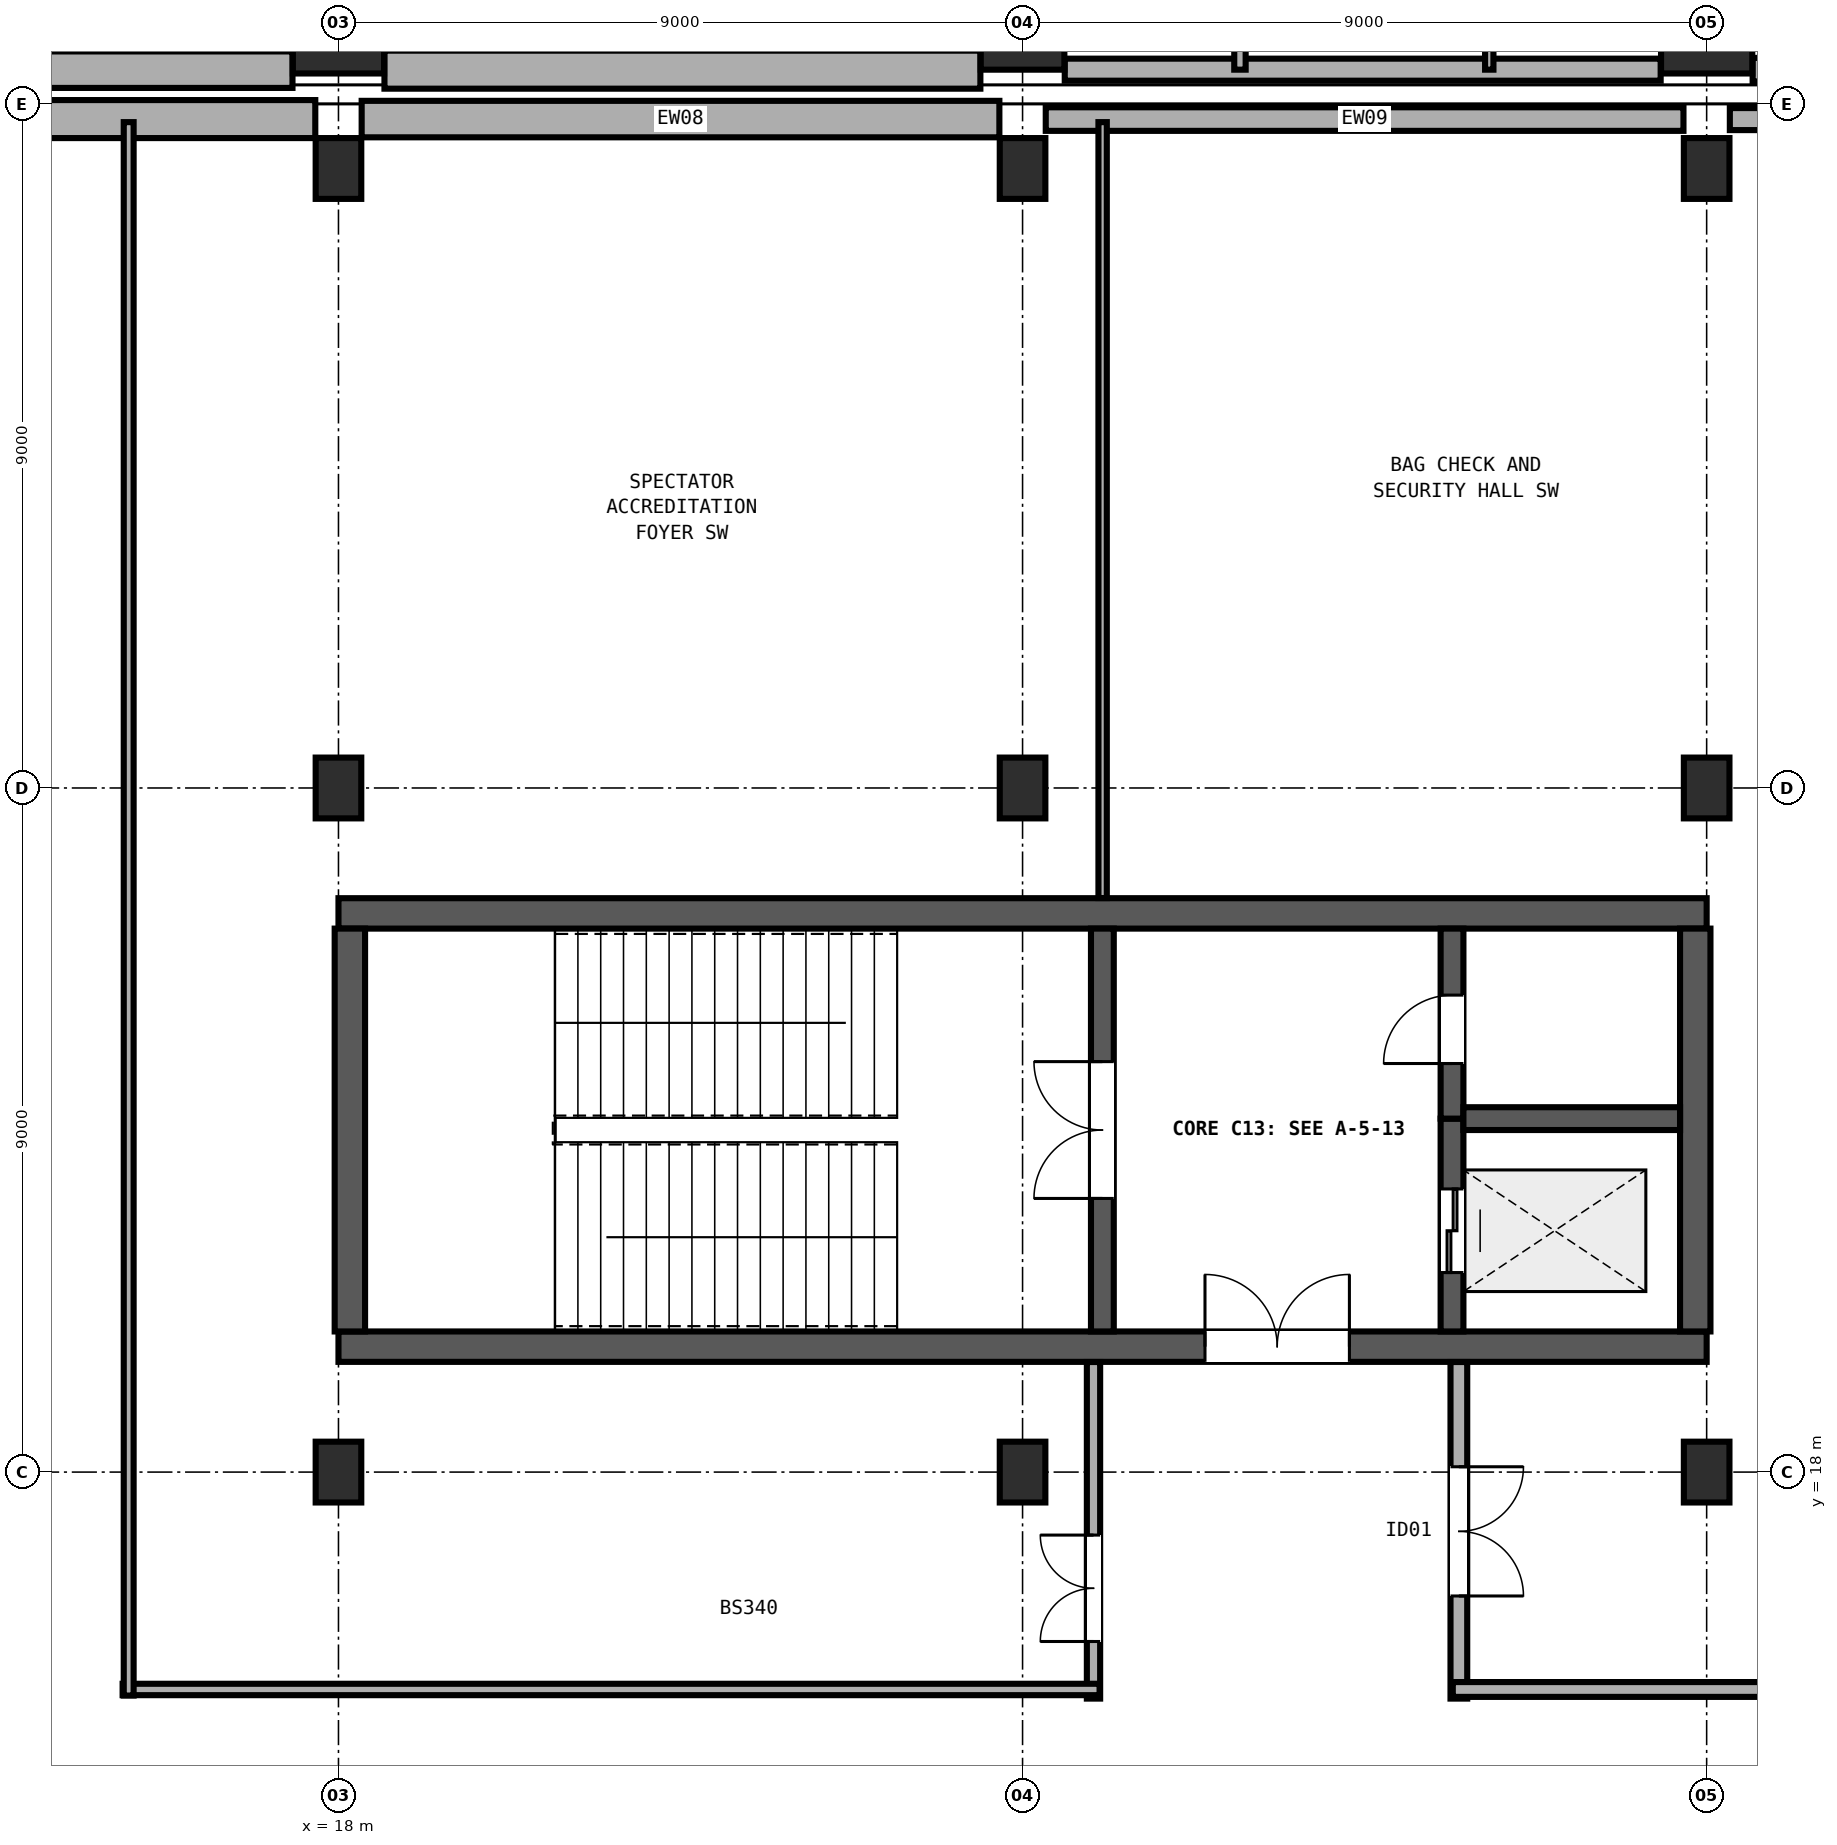
"""IFC4 building model, lengths in metres.
Left out: names, types, materials, properties, quantities, classifications, styles, units other than length and angle.
Written with IfcOpenShell. Run it as: python <this file> out.ifc"""

import sys

from ifc_helpers import new_model, si_unit, direction, frame, frame_2d, origin, origin_2d, place, context, subcontext, project, spatial, rectangle, extrude, element, fill, save


model = new_model("IFC4")
c1 = context("Model", 3, precision=1e-05, world=origin(), true_north=direction((0.0, 1.0)))
c2 = subcontext(c1, "Body", "Model", "MODEL_VIEW")
j1 = project(units=[si_unit("LENGTHUNIT", "METRE"), si_unit("PLANEANGLEUNIT", "RADIAN")], contexts=[c1])
p1 = place(None, origin())
s1 = spatial("IfcSite", under=j1, at=p1, CompositionType="ELEMENT")
p2 = place(p1, origin())
s2 = spatial("IfcBuilding", under=s1, at=p2, CompositionType="ELEMENT")
p3 = place(p2, origin())
s3 = spatial("IfcBuildingStorey", under=s2, at=p3, CompositionType="ELEMENT", Elevation=0.0)
p4 = place(p3, frame((18.0, 37.1, 0.0), z_axis=(0.0, 0.0, 1.0), x_axis=(1.0, 0.0, 0.0)))
e1 = element("IfcColumn", 1, at=p4, inside=s3, PredefinedType="COLUMN", context=c2, shape_type="SweptSolid", body=[
    extrude(rectangle(XDim=1.2, YDim=1.4, at=origin_2d()), origin(), (0.0, 0.0, 1.0), 4.8),
])
p5 = place(p3, frame((27.0, 37.1, 0.0), z_axis=(0.0, 0.0, 1.0), x_axis=(1.0, 0.0, 0.0)))
e2 = element("IfcColumn", 2, at=p5, inside=s3, PredefinedType="COLUMN", context=c2, shape_type="SweptSolid", body=[
    extrude(rectangle(XDim=1.1, YDim=1.3, at=origin_2d()), origin(), (0.0, 0.0, 1.0), 4.8),
])
p6 = place(p3, frame((36.0, 37.1, 0.0), z_axis=(0.0, 0.0, 1.0), x_axis=(1.0, 0.0, 0.0)))
e3 = element("IfcColumn", 3, at=p6, inside=s3, PredefinedType="COLUMN", context=c2, shape_type="SweptSolid", body=[
    extrude(rectangle(XDim=1.2, YDim=1.4, at=origin_2d()), origin(), (0.0, 0.0, 1.0), 4.8),
])
for number, where, z_axis, x_axis in (
    (4, (18.0, 18.0, 0.0), (0.0, 0.0, 1.0), (1.0, 0.0, 0.0)),
    (5, (18.0, 27.0, 0.0), (0.0, 0.0, 1.0), (1.0, 0.0, 0.0)),
    (6, (18.0, 35.15, 0.0), (0.0, 0.0, 1.0), (1.0, 0.0, 0.0)),
    (7, (27.0, 18.0, 0.0), (0.0, 0.0, 1.0), (1.0, 0.0, 0.0)),
    (8, (27.0, 27.0, 0.0), (0.0, 0.0, 1.0), (1.0, 0.0, 0.0)),
    (9, (27.0, 35.15, 0.0), (0.0, 0.0, 1.0), (1.0, 0.0, 0.0)),
    (10, (36.0, 18.0, 0.0), (0.0, 0.0, 1.0), (1.0, 0.0, 0.0)),
    (11, (36.0, 27.0, 0.0), (0.0, 0.0, 1.0), (1.0, 0.0, 0.0)),
    (12, (36.0, 35.15, 0.0), (0.0, 0.0, 1.0), (1.0, 0.0, 0.0)),
):
    element("IfcColumn", number, at=place(p3, frame(where, z_axis=z_axis, x_axis=x_axis)), inside=s3, PredefinedType="COLUMN", context=c2, shape_type="SweptSolid", body=[
        extrude(rectangle(XDim=0.6, YDim=0.8, at=origin_2d()), origin(), (0.0, 0.0, 1.0), 4.8),
    ])
p7 = place(p3, frame((18.0, 19.65, 0.0), z_axis=(0.0, 0.0, 1.0), x_axis=(1.0, 0.0, 0.0)))
e13 = element("IfcWall", 13, at=p7, inside=s3, PredefinedType="SHEAR", context=c2, shape_type="SweptSolid", body=[
    extrude(rectangle(XDim=18.0, YDim=0.4, at=frame_2d((9.0, 0.0))), origin(), (0.0, 0.0, 1.0), 4.5),
])
p8 = place(p7, frame((11.4, 0.0, 0.0)))
e14 = element("IfcOpeningElement", 14, at=p8, cuts=e13, PredefinedType="OPENING", context=c2, shape_type="SweptSolid", body=[
    extrude(rectangle(XDim=1.9, YDim=2.25, at=frame_2d((0.95, 1.125))), frame((0.0, 0.21, 0.0), z_axis=(0.0, -1.0, 0.0), x_axis=(1.0, 0.0, 0.0)), (0.0, 0.0, 1.0), 0.42),
])
p9 = place(p3, frame((36.0, 25.35, 0.0), z_axis=(0.0, 0.0, 1.0), x_axis=(-1.0, 0.0, 0.0)))
e15 = element("IfcWall", 15, at=p9, inside=s3, PredefinedType="SHEAR", context=c2, shape_type="SweptSolid", body=[
    extrude(rectangle(XDim=18.0, YDim=0.4, at=frame_2d((9.0, 0.0))), origin(), (0.0, 0.0, 1.0), 4.5),
])
for number, where, z_axis, x_axis in (
    (16, (18.15, 25.15, 0.0), (0.0, 0.0, 1.0), (0.0, -1.0, 0.0)),
    (17, (35.85, 19.85, 0.0), (0.0, 0.0, 1.0), (0.0, 1.0, 0.0)),
):
    element("IfcWall", number, at=place(p3, frame(where, z_axis=z_axis, x_axis=x_axis)), inside=s3, PredefinedType="SHEAR", context=c2, shape_type="SweptSolid", body=[
        extrude(rectangle(XDim=5.3, YDim=0.4, at=frame_2d((2.65, 0.0))), origin(), (0.0, 0.0, 1.0), 4.5),
    ])
p10 = place(p3, frame((28.05, 19.85, 0.0), z_axis=(0.0, 0.0, 1.0), x_axis=(0.0, 1.0, 0.0)))
e18 = element("IfcWall", 18, at=p10, inside=s3, PredefinedType="SHEAR", context=c2, shape_type="SweptSolid", body=[
    extrude(rectangle(XDim=5.3, YDim=0.3, at=frame_2d((2.65, 0.0))), origin(), (0.0, 0.0, 1.0), 4.5),
])
p11 = place(p10, frame((1.75, 0.0, 0.0)))
e19 = element("IfcOpeningElement", 19, at=p11, cuts=e18, PredefinedType="OPENING", context=c2, shape_type="SweptSolid", body=[
    extrude(rectangle(XDim=1.8, YDim=2.25, at=frame_2d((0.9, 1.125))), frame((0.0, 0.16, 0.0), z_axis=(0.0, -1.0, 0.0), x_axis=(1.0, 0.0, 0.0)), (0.0, 0.0, 1.0), 0.32),
])
p12 = place(p3, frame((32.65, 19.85, 0.0), z_axis=(0.0, 0.0, 1.0), x_axis=(0.0, 1.0, 0.0)))
e20 = element("IfcWall", 20, at=p12, inside=s3, PredefinedType="SHEAR", context=c2, shape_type="SweptSolid", body=[
    extrude(rectangle(XDim=2.8, YDim=0.3, at=frame_2d((1.4, 0.0))), origin(), (0.0, 0.0, 1.0), 4.5),
])
p13 = place(p12, frame((0.775, 0.0, 0.0)))
e21 = element("IfcOpeningElement", 21, at=p13, cuts=e20, PredefinedType="OPENING", context=c2, shape_type="SweptSolid", body=[
    extrude(rectangle(XDim=1.1, YDim=2.1, at=frame_2d((0.55, 1.05))), frame((0.0, 0.16, 0.0), z_axis=(0.0, -1.0, 0.0), x_axis=(1.0, 0.0, 0.0)), (0.0, 0.0, 1.0), 0.32),
])
p14 = place(p3, frame((32.65, 22.65, 0.0), z_axis=(0.0, 0.0, 1.0), x_axis=(0.0, 1.0, 0.0)))
e22 = element("IfcWall", 22, at=p14, inside=s3, PredefinedType="SHEAR", context=c2, shape_type="SweptSolid", body=[
    extrude(rectangle(XDim=2.5, YDim=0.3, at=frame_2d((1.25, 0.0))), origin(), (0.0, 0.0, 1.0), 4.5),
])
p15 = place(p14, frame((0.725, 0.0, 0.0)))
e23 = element("IfcOpeningElement", 23, at=p15, cuts=e22, PredefinedType="OPENING", context=c2, shape_type="SweptSolid", body=[
    extrude(rectangle(XDim=0.9, YDim=2.1, at=frame_2d((0.45, 1.05))), frame((0.0, 0.16, 0.0), z_axis=(0.0, -1.0, 0.0), x_axis=(1.0, 0.0, 0.0)), (0.0, 0.0, 1.0), 0.32),
])
p16 = place(p3, frame((32.8, 22.65, 0.0), z_axis=(0.0, 0.0, 1.0), x_axis=(1.0, 0.0, 0.0)))
e24 = element("IfcWall", 24, at=p16, inside=s3, PredefinedType="SHEAR", context=c2, shape_type="SweptSolid", body=[
    extrude(rectangle(XDim=2.85, YDim=0.3, at=frame_2d((1.425, 0.0))), origin(), (0.0, 0.0, 1.0), 4.5),
])
p17 = place(p3, frame((43.745, 36.45, 0.0), z_axis=(0.0, 0.0, 1.0), x_axis=(-1.0, 0.0, 0.0)))
e25 = element("IfcWall", 25, at=p17, inside=s3, PredefinedType="SOLIDWALL", context=c2, shape_type="SweptSolid", body=[
    extrude(rectangle(XDim=7.14, YDim=0.31, at=frame_2d((3.57, 0.0))), origin(), (0.0, 0.0, 1.0), 3.28),
])
p18 = place(p3, frame((35.395, 36.45, 0.0), z_axis=(0.0, 0.0, 1.0), x_axis=(-1.0, 0.0, 0.0)))
e26 = element("IfcWall", 26, at=p18, inside=s3, PredefinedType="SOLIDWALL", context=c2, shape_type="SweptSolid", body=[
    extrude(rectangle(XDim=7.84, YDim=0.29, at=frame_2d((3.92, 0.0))), origin(), (0.0, 0.0, 1.0), 3.28),
])
p19 = place(p3, frame((26.445, 36.45, 0.0), z_axis=(0.0, 0.0, 1.0), x_axis=(-1.0, 0.0, 0.0)))
e27 = element("IfcWall", 27, at=p19, inside=s3, PredefinedType="SOLIDWALL", context=c2, shape_type="SweptSolid", body=[
    extrude(rectangle(XDim=7.84, YDim=0.5, at=frame_2d((3.92, 0.0))), origin(), (0.0, 0.0, 1.0), 3.28),
])
p20 = place(p3, frame((17.395, 36.45, 0.0), z_axis=(0.0, 0.0, 1.0), x_axis=(-1.0, 0.0, 0.0)))
e28 = element("IfcWall", 28, at=p20, inside=s3, PredefinedType="SOLIDWALL", context=c2, shape_type="SweptSolid", body=[
    extrude(rectangle(XDim=7.84, YDim=0.48, at=frame_2d((3.92, 0.0))), origin(), (0.0, 0.0, 1.0), 3.28),
])
p21 = place(p3, frame((9.305, 35.8, 0.0), z_axis=(0.0, 0.0, 1.0), x_axis=(1.0, 0.0, 0.0)))
e29 = element("IfcWall", 29, at=p21, inside=s3, PredefinedType="SOLIDWALL", context=c2, shape_type="SweptSolid", body=[
    extrude(rectangle(XDim=8.39, YDim=0.5, at=frame_2d((4.195, 0.0))), origin(), (0.0, 0.0, 1.0), 3.28),
])
p22 = place(p3, frame((18.305, 35.8, 0.0), z_axis=(0.0, 0.0, 1.0), x_axis=(1.0, 0.0, 0.0)))
e30 = element("IfcWall", 30, at=p22, inside=s3, PredefinedType="SOLIDWALL", context=c2, shape_type="SweptSolid", body=[
    extrude(rectangle(XDim=8.39, YDim=0.48, at=frame_2d((4.195, 0.0))), origin(), (0.0, 0.0, 1.0), 3.28),
])
p23 = place(p3, frame((27.305, 35.8, 0.0), z_axis=(0.0, 0.0, 1.0), x_axis=(1.0, 0.0, 0.0)))
e31 = element("IfcWall", 31, at=p23, inside=s3, PredefinedType="SOLIDWALL", context=c2, shape_type="SweptSolid", body=[
    extrude(rectangle(XDim=8.39, YDim=0.31, at=frame_2d((4.195, 0.0))), origin(), (0.0, 0.0, 1.0), 3.28),
])
p24 = place(p3, frame((36.305, 35.8, 0.0), z_axis=(0.0, 0.0, 1.0), x_axis=(1.0, 0.0, 0.0)))
e32 = element("IfcWall", 32, at=p24, inside=s3, PredefinedType="SOLIDWALL", context=c2, shape_type="SweptSolid", body=[
    extrude(rectangle(XDim=8.39, YDim=0.29, at=frame_2d((4.195, 0.0))), origin(), (0.0, 0.0, 1.0), 3.28),
])
p25 = place(p3, frame((17.95, 53.148, 0.0), z_axis=(0.0, 0.0, 1.0), x_axis=(0.0, -1.0, 0.0)))
e33 = element("IfcWall", 33, at=p25, inside=s3, PredefinedType="PARTITIONING", context=c2, shape_type="SweptSolid", body=[
    extrude(rectangle(XDim=16.658, YDim=0.11, at=frame_2d((8.329, 0.0))), origin(), (0.0, 0.0, 1.0), 3.28),
])
p26 = place(p3, frame((29.86, 36.45, 0.0), z_axis=(0.0, 0.0, 1.0), x_axis=(0.0, 1.0, 0.0)))
e34 = element("IfcWall", 34, at=p26, inside=s3, PredefinedType="PARTITIONING", context=c2, shape_type="SweptSolid", body=[
    extrude(rectangle(XDim=22.78, YDim=0.15, at=frame_2d((11.39, 0.0))), origin(), (0.0, 0.0, 1.0), 3.28),
])
p27 = place(p26, frame((10.615, 0.0, 0.0)))
e35 = element("IfcOpeningElement", 35, at=p27, cuts=e34, PredefinedType="OPENING", context=c2, shape_type="SweptSolid", body=[
    extrude(rectangle(XDim=1.55, YDim=2.2, at=frame_2d((0.775, 1.1))), frame((0.0, 0.085, 0.0), z_axis=(0.0, -1.0, 0.0), x_axis=(1.0, 0.0, 0.0)), (0.0, 0.0, 1.0), 0.17),
])
p28 = place(p3, frame((33.14, 54.342, 0.0), z_axis=(0.0, 0.0, 1.0), x_axis=(0.0, -1.0, 0.0)))
e36 = element("IfcWall", 36, at=p28, inside=s3, PredefinedType="PARTITIONING", context=c2, shape_type="SweptSolid", body=[
    extrude(rectangle(XDim=17.892, YDim=0.11, at=frame_2d((8.946, 0.0))), origin(), (0.0, 0.0, 1.0), 3.28),
])
p29 = place(p28, frame((8.246, 0.0, 0.0)))
e37 = element("IfcOpeningElement", 37, at=p29, cuts=e36, PredefinedType="OPENING", context=c2, shape_type="SweptSolid", body=[
    extrude(rectangle(XDim=1.4, YDim=2.15, at=frame_2d((0.7, 1.075))), frame((0.0, 0.065, 0.0), z_axis=(0.0, -1.0, 0.0), x_axis=(1.0, 0.0, 0.0)), (0.0, 0.0, 1.0), 0.13),
])
p30 = place(p3, frame((27.933, 15.02, 0.0), z_axis=(0.0, 0.0, 1.0), x_axis=(0.0, 1.0, 0.0)))
e38 = element("IfcWall", 38, at=p30, inside=s3, PredefinedType="PARTITIONING", context=c2, shape_type="SweptSolid", body=[
    extrude(rectangle(XDim=4.428, YDim=0.175, at=frame_2d((2.214, 0.0))), origin(), (0.0, 0.0, 1.0), 3.28),
])
p31 = place(p30, frame((0.751, 0.0, 0.0)))
e39 = element("IfcOpeningElement", 39, at=p31, cuts=e38, PredefinedType="OPENING", context=c2, shape_type="SweptSolid", body=[
    extrude(rectangle(XDim=1.4, YDim=2.15, at=frame_2d((0.7, 1.075))), frame((0.0, 0.097, 0.0), z_axis=(0.0, -1.0, 0.0), x_axis=(1.0, 0.0, 0.0)), (0.0, 0.0, 1.0), 0.195),
])
p32 = place(p3, frame((28.013, 15.14, 0.0), z_axis=(0.0, 0.0, 1.0), x_axis=(-1.0, 0.0, 0.0)))
e40 = element("IfcWall", 40, at=p32, inside=s3, PredefinedType="PARTITIONING", context=c2, shape_type="SweptSolid", body=[
    extrude(rectangle(XDim=12.853, YDim=0.15, at=frame_2d((6.427, 0.0))), origin(), (0.0, 0.0, 1.0), 3.28),
])
p33 = place(p3, frame((15.24, 15.06, 0.0), z_axis=(0.0, 0.0, 1.0), x_axis=(0.0, 1.0, 0.0)))
e41 = element("IfcWall", 41, at=p33, inside=s3, PredefinedType="PARTITIONING", context=c2, shape_type="SweptSolid", body=[
    extrude(rectangle(XDim=20.7, YDim=0.13, at=frame_2d((10.35, 0.0))), origin(), (0.0, 0.0, 1.0), 3.28),
])
p34 = place(p3, frame((28.053, 35.76, 0.0), z_axis=(0.0, 0.0, 1.0), x_axis=(0.0, -1.0, 0.0)))
e42 = element("IfcWall", 42, at=p34, inside=s3, PredefinedType="PARTITIONING", context=c2, shape_type="SweptSolid", body=[
    extrude(rectangle(XDim=10.208, YDim=0.11, at=frame_2d((5.104, 0.0))), origin(), (0.0, 0.0, 1.0), 3.28),
])
p35 = place(p3, frame((32.74, 19.448, 0.0), z_axis=(0.0, 0.0, 1.0), x_axis=(0.0, -1.0, 0.0)))
e43 = element("IfcWall", 43, at=p35, inside=s3, PredefinedType="PARTITIONING", context=c2, shape_type="SweptSolid", body=[
    extrude(rectangle(XDim=4.428, YDim=0.22, at=frame_2d((2.214, 0.0))), origin(), (0.0, 0.0, 1.0), 3.28),
])
p36 = place(p35, frame((1.378, 0.0, 0.0)))
e44 = element("IfcOpeningElement", 44, at=p36, cuts=e43, PredefinedType="OPENING", context=c2, shape_type="SweptSolid", body=[
    extrude(rectangle(XDim=1.7, YDim=2.2, at=frame_2d((0.85, 1.1))), frame((0.0, 0.12, 0.0), z_axis=(0.0, -1.0, 0.0), x_axis=(1.0, 0.0, 0.0)), (0.0, 0.0, 1.0), 0.24),
])
p37 = place(p3, frame((40.827, 15.14, 0.0), z_axis=(0.0, 0.0, 1.0), x_axis=(-1.0, 0.0, 0.0)))
e45 = element("IfcWall", 45, at=p37, inside=s3, PredefinedType="PARTITIONING", context=c2, shape_type="SweptSolid", body=[
    extrude(rectangle(XDim=8.167, YDim=0.195, at=frame_2d((4.083, 0.0))), origin(), (0.0, 0.0, 1.0), 3.28),
])
p38 = place(p11, origin())
e46 = element("IfcDoor", 46, at=p38, inside=s3, OperationType="DOUBLE_DOOR_SINGLE_SWING", PredefinedType="DOOR", context=c2, shape_type="SweptSolid", body=[
    extrude(rectangle(XDim=1.8, YDim=2.25, at=frame_2d((0.9, 1.125))), frame((0.0, 0.025, 0.0), z_axis=(0.0, -1.0, 0.0), x_axis=(1.0, 0.0, 0.0)), (0.0, 0.0, 1.0), 0.05),
])
fill(e19, e46)
p39 = place(p15, origin())
e47 = element("IfcDoor", 47, at=p39, inside=s3, OperationType="SINGLE_SWING_LEFT", PredefinedType="DOOR", context=c2, shape_type="SweptSolid", body=[
    extrude(rectangle(XDim=0.9, YDim=2.1, at=frame_2d((0.45, 1.05))), frame((0.0, 0.025, 0.0), z_axis=(0.0, -1.0, 0.0), x_axis=(1.0, 0.0, 0.0)), (0.0, 0.0, 1.0), 0.05),
])
fill(e23, e47)
p40 = place(p13, origin())
e48 = element("IfcDoor", 48, at=p40, inside=s3, OperationType="DOUBLE_DOOR_SLIDING", PredefinedType="DOOR", context=c2, shape_type="SweptSolid", body=[
    extrude(rectangle(XDim=1.1, YDim=2.1, at=frame_2d((0.55, 1.05))), frame((0.0, 0.025, 0.0), z_axis=(0.0, -1.0, 0.0), x_axis=(1.0, 0.0, 0.0)), (0.0, 0.0, 1.0), 0.05),
])
fill(e21, e48)
p41 = place(p8, origin())
e49 = element("IfcDoor", 49, at=p41, inside=s3, OperationType="DOUBLE_DOOR_SINGLE_SWING", PredefinedType="DOOR", context=c2, shape_type="SweptSolid", body=[
    extrude(rectangle(XDim=1.9, YDim=2.25, at=frame_2d((0.95, 1.125))), frame((0.0, 0.025, 0.0), z_axis=(0.0, -1.0, 0.0), x_axis=(1.0, 0.0, 0.0)), (0.0, 0.0, 1.0), 0.05),
])
fill(e14, e49)
p42 = place(p31, origin())
e50 = element("IfcDoor", 50, at=p42, inside=s3, OperationType="DOUBLE_DOOR_SINGLE_SWING", PredefinedType="DOOR", context=c2, shape_type="SweptSolid", body=[
    extrude(rectangle(XDim=1.4, YDim=2.15, at=frame_2d((0.7, 1.075))), frame((0.0, 0.025, 0.0), z_axis=(0.0, -1.0, 0.0), x_axis=(1.0, 0.0, 0.0)), (0.0, 0.0, 1.0), 0.05),
])
fill(e39, e50)
p43 = place(p36, origin())
e51 = element("IfcDoor", 51, at=p43, inside=s3, OperationType="DOUBLE_DOOR_SINGLE_SWING", PredefinedType="DOOR", context=c2, shape_type="SweptSolid", body=[
    extrude(rectangle(XDim=1.7, YDim=2.2, at=frame_2d((0.85, 1.1))), frame((0.0, 0.025, 0.0), z_axis=(0.0, -1.0, 0.0), x_axis=(1.0, 0.0, 0.0)), (0.0, 0.0, 1.0), 0.05),
])
fill(e44, e51)
save(model, sys.argv[1])
